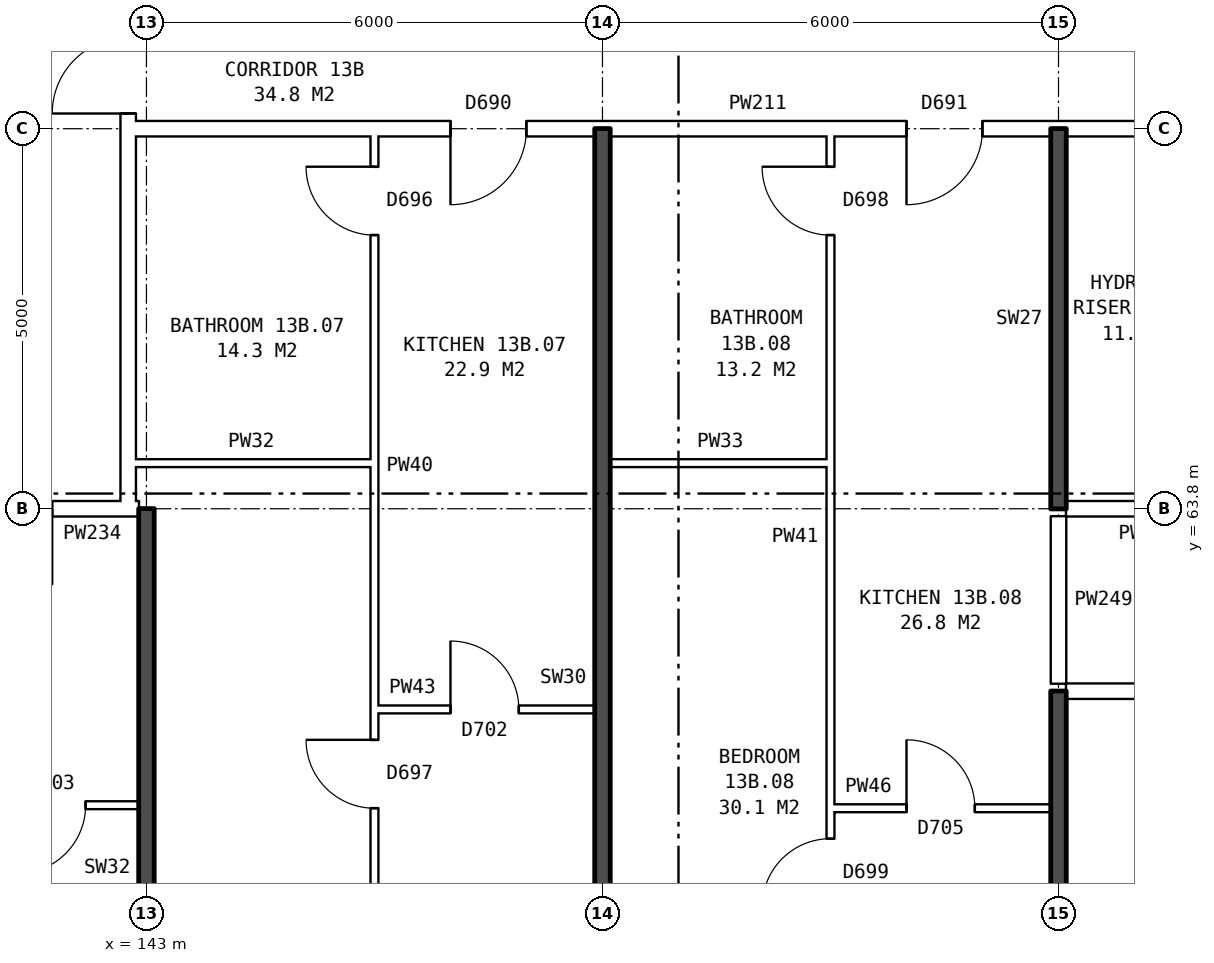
"""IFC4 building model, lengths in metres.
Left out: names, types, materials, properties, quantities, classifications, styles, units other than length and angle.
Written with IfcOpenShell. Run it as: python <this file> out.ifc"""

import sys

from ifc_helpers import new_model, si_unit, direction, frame, frame_2d, origin, place, context, subcontext, project, spatial, rectangle, extrude, element, fill, save


model = new_model("IFC4")
c1 = context("Model", 3, precision=1e-05, world=origin(), true_north=direction((0.0, 1.0)))
c2 = subcontext(c1, "Body", "Model", "MODEL_VIEW")
j1 = project(units=[si_unit("LENGTHUNIT", "METRE"), si_unit("PLANEANGLEUNIT", "RADIAN")], contexts=[c1])
p1 = place(None, origin())
s1 = spatial("IfcSite", under=j1, at=p1, CompositionType="ELEMENT")
p2 = place(p1, origin())
s2 = spatial("IfcBuilding", under=s1, at=p2, CompositionType="ELEMENT")
p3 = place(p2, frame((0.0, 0.0, 50.5)))
s3 = spatial("IfcBuildingStorey", under=s2, at=p3, CompositionType="ELEMENT", Elevation=50.5)
p4 = place(p3, frame((142.76, 63.9, 0.0), z_axis=(0.0, 0.0, 1.0), x_axis=(0.0, 1.0, 0.0)))
e1 = element("IfcWall", 1, at=p4, inside=s3, PredefinedType="PARTITIONING", context=c2, shape_type="SweptSolid", body=[
    extrude(rectangle(XDim=12.2, YDim=0.2, at=frame_2d((6.1, 0.0))), origin(), (0.0, 0.0, 1.0), 2.85),
])
p5 = place(p4, frame((5.1, 0.0, 0.0)))
e2 = element("IfcOpeningElement", 2, at=p5, cuts=e1, PredefinedType="OPENING", context=c2, shape_type="SweptSolid", body=[
    extrude(rectangle(XDim=2.0, YDim=2.1, at=frame_2d((1.0, 1.05))), frame((0.0, 0.11, 0.0), z_axis=(0.0, -1.0, 0.0), x_axis=(1.0, 0.0, 0.0)), (0.0, 0.0, 1.0), 0.22),
])
p6 = place(p3, frame((152.0, 59.86, 0.0), z_axis=(0.0, 0.0, 1.0), x_axis=(1.0, 0.0, 0.0)))
e3 = element("IfcWall", 3, at=p6, inside=s3, PredefinedType="PARTITIONING", context=c2, shape_type="SweptSolid", body=[
    extrude(rectangle(XDim=2.9, YDim=0.1, at=frame_2d((1.45, 0.0))), origin(), (0.0, 0.0, 1.0), 2.85),
])
p7 = place(p6, frame((1.0, 0.0, 0.0)))
e4 = element("IfcOpeningElement", 4, at=p7, cuts=e3, PredefinedType="OPENING", context=c2, shape_type="SweptSolid", body=[
    extrude(rectangle(XDim=0.9, YDim=2.1, at=frame_2d((0.45, 1.05))), frame((0.0, 0.06, 0.0), z_axis=(0.0, -1.0, 0.0), x_axis=(1.0, 0.0, 0.0)), (0.0, 0.0, 1.0), 0.12),
])
p8 = place(p3, frame((137.1, 59.9, 0.0), z_axis=(0.0, 0.0, 1.0), x_axis=(1.0, 0.0, 0.0)))
e5 = element("IfcWall", 5, at=p8, inside=s3, PredefinedType="PARTITIONING", context=c2, shape_type="SweptSolid", body=[
    extrude(rectangle(XDim=5.8, YDim=0.1, at=frame_2d((2.9, 0.0))), origin(), (0.0, 0.0, 1.0), 2.85),
])
p9 = place(p8, frame((1.3, 0.0, 0.0)))
e6 = element("IfcOpeningElement", 6, at=p9, cuts=e5, PredefinedType="OPENING", context=c2, shape_type="SweptSolid", body=[
    extrude(rectangle(XDim=0.9, YDim=2.1, at=frame_2d((0.45, 1.05))), frame((0.0, 0.06, 0.0), z_axis=(0.0, -1.0, 0.0), x_axis=(1.0, 0.0, 0.0)), (0.0, 0.0, 1.0), 0.12),
])
p10 = place(p8, frame((4.2, 0.0, 0.0)))
e7 = element("IfcOpeningElement", 7, at=p10, cuts=e5, PredefinedType="OPENING", context=c2, shape_type="SweptSolid", body=[
    extrude(rectangle(XDim=0.9, YDim=2.1, at=frame_2d((0.45, 1.05))), frame((0.0, 0.06, 0.0), z_axis=(0.0, -1.0, 0.0), x_axis=(1.0, 0.0, 0.0)), (0.0, 0.0, 1.0), 0.12),
])
p11 = place(p3, frame((146.0, 61.16, 0.0), z_axis=(0.0, 0.0, 1.0), x_axis=(1.0, 0.0, 0.0)))
e8 = element("IfcWall", 8, at=p11, inside=s3, PredefinedType="PARTITIONING", context=c2, shape_type="SweptSolid", body=[
    extrude(rectangle(XDim=2.9, YDim=0.1, at=frame_2d((1.45, 0.0))), origin(), (0.0, 0.0, 1.0), 2.85),
])
p12 = place(p11, frame((1.0, 0.0, 0.0)))
e9 = element("IfcOpeningElement", 9, at=p12, cuts=e8, PredefinedType="OPENING", context=c2, shape_type="SweptSolid", body=[
    extrude(rectangle(XDim=0.9, YDim=2.1, at=frame_2d((0.45, 1.05))), frame((0.0, 0.06, 0.0), z_axis=(0.0, -1.0, 0.0), x_axis=(1.0, 0.0, 0.0)), (0.0, 0.0, 1.0), 0.12),
])
p13 = place(p3, frame((155.1, 61.4, 0.0), z_axis=(0.0, 0.0, 1.0), x_axis=(1.0, 0.0, 0.0)))
e10 = element("IfcWall", 10, at=p13, inside=s3, PredefinedType="PARTITIONING", context=c2, shape_type="SweptSolid", body=[
    extrude(rectangle(XDim=21.04, YDim=0.2, at=frame_2d((10.52, 0.0))), origin(), (0.0, 0.0, 1.0), 2.85),
])
p14 = place(p13, frame((2.45, 0.0, 0.0)))
e11 = element("IfcOpeningElement", 11, at=p14, cuts=e10, PredefinedType="OPENING", context=c2, shape_type="SweptSolid", body=[
    extrude(rectangle(XDim=1.0, YDim=2.1, at=frame_2d((0.5, 1.05))), frame((0.0, 0.11, 0.0), z_axis=(0.0, -1.0, 0.0), x_axis=(1.0, 0.0, 0.0)), (0.0, 0.0, 1.0), 0.22),
])
p15 = place(p13, frame((14.4, 0.0, 0.0)))
e12 = element("IfcOpeningElement", 12, at=p15, cuts=e10, PredefinedType="OPENING", context=c2, shape_type="SweptSolid", body=[
    extrude(rectangle(XDim=1.0, YDim=2.1, at=frame_2d((0.5, 1.05))), frame((0.0, 0.11, 0.0), z_axis=(0.0, -1.0, 0.0), x_axis=(1.0, 0.0, 0.0)), (0.0, 0.0, 1.0), 0.22),
])
p16 = place(p3, frame((139.76, 63.8, 0.0), z_axis=(0.0, 0.0, 1.0), x_axis=(1.0, 0.0, 0.0)))
e13 = element("IfcWall", 13, at=p16, inside=s3, PredefinedType="PARTITIONING", context=c2, shape_type="SweptSolid", body=[
    extrude(rectangle(XDim=3.0, YDim=0.2, at=frame_2d((1.5, 0.0))), origin(), (0.0, 0.0, 1.0), 2.85),
])
p17 = place(p16, frame((1.0, 0.0, 0.0)))
e14 = element("IfcOpeningElement", 14, at=p17, cuts=e13, PredefinedType="OPENING", context=c2, shape_type="SweptSolid", body=[
    extrude(rectangle(XDim=1.0, YDim=2.1, at=frame_2d((0.5, 1.05))), frame((0.0, 0.11, 0.0), z_axis=(0.0, -1.0, 0.0), x_axis=(1.0, 0.0, 0.0)), (0.0, 0.0, 1.0), 0.22),
])
p18 = place(p3, frame((142.76, 63.8, 0.0), z_axis=(0.0, 0.0, 1.0), x_axis=(1.0, 0.0, 0.0)))
e15 = element("IfcWall", 15, at=p18, inside=s3, PredefinedType="PARTITIONING", context=c2, shape_type="SweptSolid", body=[
    extrude(rectangle(XDim=0.14, YDim=0.2, at=frame_2d((0.07, 0.0))), origin(), (0.0, 0.0, 1.0), 2.85),
])
p19 = place(p3, frame((155.1, 63.8, 0.0), z_axis=(0.0, 0.0, 1.0), x_axis=(1.0, 0.0, 0.0)))
e16 = element("IfcWall", 16, at=p19, inside=s3, PredefinedType="PARTITIONING", context=c2, shape_type="SweptSolid", body=[
    extrude(rectangle(XDim=2.14, YDim=0.2, at=frame_2d((1.07, 0.0))), origin(), (0.0, 0.0, 1.0), 2.85),
])
p20 = place(p3, frame((142.76, 64.4, 0.0), z_axis=(0.0, 0.0, 1.0), x_axis=(1.0, 0.0, 0.0)))
e17 = element("IfcWall", 17, at=p20, inside=s3, PredefinedType="PARTITIONING", context=c2, shape_type="SweptSolid", body=[
    extrude(rectangle(XDim=3.24, YDim=0.1, at=frame_2d((1.62, 0.0))), origin(), (0.0, 0.0, 1.0), 2.85),
])
p21 = place(p3, frame((149.1, 64.4, 0.0), z_axis=(0.0, 0.0, 1.0), x_axis=(1.0, 0.0, 0.0)))
e18 = element("IfcWall", 18, at=p21, inside=s3, PredefinedType="PARTITIONING", context=c2, shape_type="SweptSolid", body=[
    extrude(rectangle(XDim=2.9, YDim=0.1, at=frame_2d((1.45, 0.0))), origin(), (0.0, 0.0, 1.0), 2.85),
])
p22 = place(p3, frame((142.76, 68.8, 0.0), z_axis=(0.0, 0.0, 1.0), x_axis=(1.0, 0.0, 0.0)))
e19 = element("IfcWall", 19, at=p22, inside=s3, PredefinedType="PARTITIONING", context=c2, shape_type="SweptSolid", body=[
    extrude(rectangle(XDim=14.48, YDim=0.2, at=frame_2d((7.24, 0.0))), origin(), (0.0, 0.0, 1.0), 2.85),
])
p23 = place(p22, frame((4.24, 0.0, 0.0)))
e20 = element("IfcOpeningElement", 20, at=p23, cuts=e19, PredefinedType="OPENING", context=c2, shape_type="SweptSolid", body=[
    extrude(rectangle(XDim=1.0, YDim=2.1, at=frame_2d((0.5, 1.05))), frame((0.0, 0.11, 0.0), z_axis=(0.0, -1.0, 0.0), x_axis=(1.0, 0.0, 0.0)), (0.0, 0.0, 1.0), 0.22),
])
p24 = place(p22, frame((10.24, 0.0, 0.0)))
e21 = element("IfcOpeningElement", 21, at=p24, cuts=e19, PredefinedType="OPENING", context=c2, shape_type="SweptSolid", body=[
    extrude(rectangle(XDim=1.0, YDim=2.1, at=frame_2d((0.5, 1.05))), frame((0.0, 0.11, 0.0), z_axis=(0.0, -1.0, 0.0), x_axis=(1.0, 0.0, 0.0)), (0.0, 0.0, 1.0), 0.22),
])
p25 = place(p3, frame((143.0, 54.36, 0.0), z_axis=(0.0, 0.0, 1.0), x_axis=(0.0, 1.0, 0.0)))
e22 = element("IfcWall", 22, at=p25, inside=s3, PredefinedType="SOLIDWALL", context=c2, shape_type="SweptSolid", body=[
    extrude(rectangle(XDim=9.44, YDim=0.2, at=frame_2d((4.72, 0.0))), origin(), (0.0, 0.0, 1.0), 2.85),
])
p26 = place(p3, frame((146.0, 54.36, 0.0), z_axis=(0.0, 0.0, 1.0), x_axis=(0.0, 1.0, 0.0)))
e23 = element("IfcWall", 23, at=p26, inside=s3, PredefinedType="PARTITIONING", context=c2, shape_type="SweptSolid", body=[
    extrude(rectangle(XDim=14.34, YDim=0.1, at=frame_2d((7.17, 0.0))), origin(), (0.0, 0.0, 1.0), 2.85),
])
p27 = place(p26, frame((5.5, 0.0, 0.0)))
e24 = element("IfcOpeningElement", 24, at=p27, cuts=e23, PredefinedType="OPENING", context=c2, shape_type="SweptSolid", body=[
    extrude(rectangle(XDim=0.9, YDim=2.1, at=frame_2d((0.45, 1.05))), frame((0.0, 0.06, 0.0), z_axis=(0.0, -1.0, 0.0), x_axis=(1.0, 0.0, 0.0)), (0.0, 0.0, 1.0), 0.12),
])
p28 = place(p26, frame((13.04, 0.0, 0.0)))
e25 = element("IfcOpeningElement", 25, at=p28, cuts=e23, PredefinedType="OPENING", context=c2, shape_type="SweptSolid", body=[
    extrude(rectangle(XDim=0.9, YDim=2.1, at=frame_2d((0.45, 1.05))), frame((0.0, 0.06, 0.0), z_axis=(0.0, -1.0, 0.0), x_axis=(1.0, 0.0, 0.0)), (0.0, 0.0, 1.0), 0.12),
])
p29 = place(p3, frame((149.0, 54.36, 0.0), z_axis=(0.0, 0.0, 1.0), x_axis=(0.0, 1.0, 0.0)))
e26 = element("IfcWall", 26, at=p29, inside=s3, PredefinedType="SOLIDWALL", context=c2, shape_type="SweptSolid", body=[
    extrude(rectangle(XDim=14.44, YDim=0.2, at=frame_2d((7.22, 0.0))), origin(), (0.0, 0.0, 1.0), 2.85),
])
p30 = place(p3, frame((152.0, 54.36, 0.0), z_axis=(0.0, 0.0, 1.0), x_axis=(0.0, 1.0, 0.0)))
e27 = element("IfcWall", 27, at=p30, inside=s3, PredefinedType="PARTITIONING", context=c2, shape_type="SweptSolid", body=[
    extrude(rectangle(XDim=14.34, YDim=0.1, at=frame_2d((7.17, 0.0))), origin(), (0.0, 0.0, 1.0), 2.85),
])
p31 = place(p30, frame((4.2, 0.0, 0.0)))
e28 = element("IfcOpeningElement", 28, at=p31, cuts=e27, PredefinedType="OPENING", context=c2, shape_type="SweptSolid", body=[
    extrude(rectangle(XDim=0.9, YDim=2.1, at=frame_2d((0.45, 1.05))), frame((0.0, 0.06, 0.0), z_axis=(0.0, -1.0, 0.0), x_axis=(1.0, 0.0, 0.0)), (0.0, 0.0, 1.0), 0.12),
])
p32 = place(p30, frame((13.04, 0.0, 0.0)))
e29 = element("IfcOpeningElement", 29, at=p32, cuts=e27, PredefinedType="OPENING", context=c2, shape_type="SweptSolid", body=[
    extrude(rectangle(XDim=0.9, YDim=2.1, at=frame_2d((0.45, 1.05))), frame((0.0, 0.06, 0.0), z_axis=(0.0, -1.0, 0.0), x_axis=(1.0, 0.0, 0.0)), (0.0, 0.0, 1.0), 0.12),
])
p33 = place(p3, frame((155.0, 54.36, 0.0), z_axis=(0.0, 0.0, 1.0), x_axis=(0.0, 1.0, 0.0)))
e30 = element("IfcWall", 30, at=p33, inside=s3, PredefinedType="SOLIDWALL", context=c2, shape_type="SweptSolid", body=[
    extrude(rectangle(XDim=7.04, YDim=0.2, at=frame_2d((3.52, 0.0))), origin(), (0.0, 0.0, 1.0), 2.85),
])
p34 = place(p3, frame((155.0, 61.5, 0.0), z_axis=(0.0, 0.0, 1.0), x_axis=(0.0, 1.0, 0.0)))
e31 = element("IfcWall", 31, at=p34, inside=s3, PredefinedType="PARTITIONING", context=c2, shape_type="SweptSolid", body=[
    extrude(rectangle(XDim=2.2, YDim=0.2, at=frame_2d((1.1, 0.0))), origin(), (0.0, 0.0, 1.0), 2.85),
])
p35 = place(p3, frame((155.0, 63.8, 0.0), z_axis=(0.0, 0.0, 1.0), x_axis=(0.0, 1.0, 0.0)))
e32 = element("IfcWall", 32, at=p35, inside=s3, PredefinedType="SOLIDWALL", context=c2, shape_type="SweptSolid", body=[
    extrude(rectangle(XDim=5.0, YDim=0.2, at=frame_2d((2.5, 0.0))), origin(), (0.0, 0.0, 1.0), 2.85),
])
p36 = place(p5, origin())
e33 = element("IfcDoor", 33, at=p36, inside=s3, OperationType="DOUBLE_DOOR_SINGLE_SWING", PredefinedType="DOOR", context=c2, shape_type="SweptSolid", body=[
    extrude(rectangle(XDim=2.0, YDim=2.1, at=frame_2d((1.0, 1.05))), frame((0.0, 0.025, 0.0), z_axis=(0.0, -1.0, 0.0), x_axis=(1.0, 0.0, 0.0)), (0.0, 0.0, 1.0), 0.05),
])
fill(e2, e33)
p37 = place(p10, frame((0.9, 0.0, 0.0), z_axis=(0.0, 0.0, 1.0), x_axis=(-1.0, 0.0, 0.0)))
e34 = element("IfcDoor", 34, at=p37, inside=s3, OperationType="SINGLE_SWING_RIGHT", PredefinedType="DOOR", context=c2, shape_type="SweptSolid", body=[
    extrude(rectangle(XDim=0.9, YDim=2.1, at=frame_2d((0.45, 1.05))), frame((0.0, 0.025, 0.0), z_axis=(0.0, -1.0, 0.0), x_axis=(1.0, 0.0, 0.0)), (0.0, 0.0, 1.0), 0.05),
])
fill(e7, e34)
p38 = place(p27, origin())
e35 = element("IfcDoor", 35, at=p38, inside=s3, OperationType="SINGLE_SWING_RIGHT", PredefinedType="DOOR", context=c2, shape_type="SweptSolid", body=[
    extrude(rectangle(XDim=0.9, YDim=2.1, at=frame_2d((0.45, 1.05))), frame((0.0, 0.025, 0.0), z_axis=(0.0, -1.0, 0.0), x_axis=(1.0, 0.0, 0.0)), (0.0, 0.0, 1.0), 0.05),
])
fill(e24, e35)
p39 = place(p23, frame((1.0, 0.0, 0.0), z_axis=(0.0, 0.0, 1.0), x_axis=(-1.0, 0.0, 0.0)))
e36 = element("IfcDoor", 36, at=p39, inside=s3, OperationType="SINGLE_SWING_RIGHT", PredefinedType="DOOR", context=c2, shape_type="SweptSolid", body=[
    extrude(rectangle(XDim=1.0, YDim=2.1, at=frame_2d((0.5, 1.05))), frame((0.0, 0.025, 0.0), z_axis=(0.0, -1.0, 0.0), x_axis=(1.0, 0.0, 0.0)), (0.0, 0.0, 1.0), 0.05),
])
fill(e20, e36)
p40 = place(p12, origin())
e37 = element("IfcDoor", 37, at=p40, inside=s3, OperationType="SINGLE_SWING_LEFT", PredefinedType="DOOR", context=c2, shape_type="SweptSolid", body=[
    extrude(rectangle(XDim=0.9, YDim=2.1, at=frame_2d((0.45, 1.05))), frame((0.0, 0.025, 0.0), z_axis=(0.0, -1.0, 0.0), x_axis=(1.0, 0.0, 0.0)), (0.0, 0.0, 1.0), 0.05),
])
fill(e9, e37)
p41 = place(p28, origin())
e38 = element("IfcDoor", 38, at=p41, inside=s3, OperationType="SINGLE_SWING_RIGHT", PredefinedType="DOOR", context=c2, shape_type="SweptSolid", body=[
    extrude(rectangle(XDim=0.9, YDim=2.1, at=frame_2d((0.45, 1.05))), frame((0.0, 0.025, 0.0), z_axis=(0.0, -1.0, 0.0), x_axis=(1.0, 0.0, 0.0)), (0.0, 0.0, 1.0), 0.05),
])
fill(e25, e38)
p42 = place(p31, origin())
e39 = element("IfcDoor", 39, at=p42, inside=s3, OperationType="SINGLE_SWING_LEFT", PredefinedType="DOOR", context=c2, shape_type="SweptSolid", body=[
    extrude(rectangle(XDim=0.9, YDim=2.1, at=frame_2d((0.45, 1.05))), frame((0.0, 0.025, 0.0), z_axis=(0.0, -1.0, 0.0), x_axis=(1.0, 0.0, 0.0)), (0.0, 0.0, 1.0), 0.05),
])
fill(e28, e39)
p43 = place(p24, frame((1.0, 0.0, 0.0), z_axis=(0.0, 0.0, 1.0), x_axis=(-1.0, 0.0, 0.0)))
e40 = element("IfcDoor", 40, at=p43, inside=s3, OperationType="SINGLE_SWING_RIGHT", PredefinedType="DOOR", context=c2, shape_type="SweptSolid", body=[
    extrude(rectangle(XDim=1.0, YDim=2.1, at=frame_2d((0.5, 1.05))), frame((0.0, 0.025, 0.0), z_axis=(0.0, -1.0, 0.0), x_axis=(1.0, 0.0, 0.0)), (0.0, 0.0, 1.0), 0.05),
])
fill(e21, e40)
p44 = place(p7, origin())
e41 = element("IfcDoor", 41, at=p44, inside=s3, OperationType="SINGLE_SWING_LEFT", PredefinedType="DOOR", context=c2, shape_type="SweptSolid", body=[
    extrude(rectangle(XDim=0.9, YDim=2.1, at=frame_2d((0.45, 1.05))), frame((0.0, 0.025, 0.0), z_axis=(0.0, -1.0, 0.0), x_axis=(1.0, 0.0, 0.0)), (0.0, 0.0, 1.0), 0.05),
])
fill(e4, e41)
p45 = place(p32, origin())
e42 = element("IfcDoor", 42, at=p45, inside=s3, OperationType="SINGLE_SWING_RIGHT", PredefinedType="DOOR", context=c2, shape_type="SweptSolid", body=[
    extrude(rectangle(XDim=0.9, YDim=2.1, at=frame_2d((0.45, 1.05))), frame((0.0, 0.025, 0.0), z_axis=(0.0, -1.0, 0.0), x_axis=(1.0, 0.0, 0.0)), (0.0, 0.0, 1.0), 0.05),
])
fill(e29, e42)
save(model, sys.argv[1])
